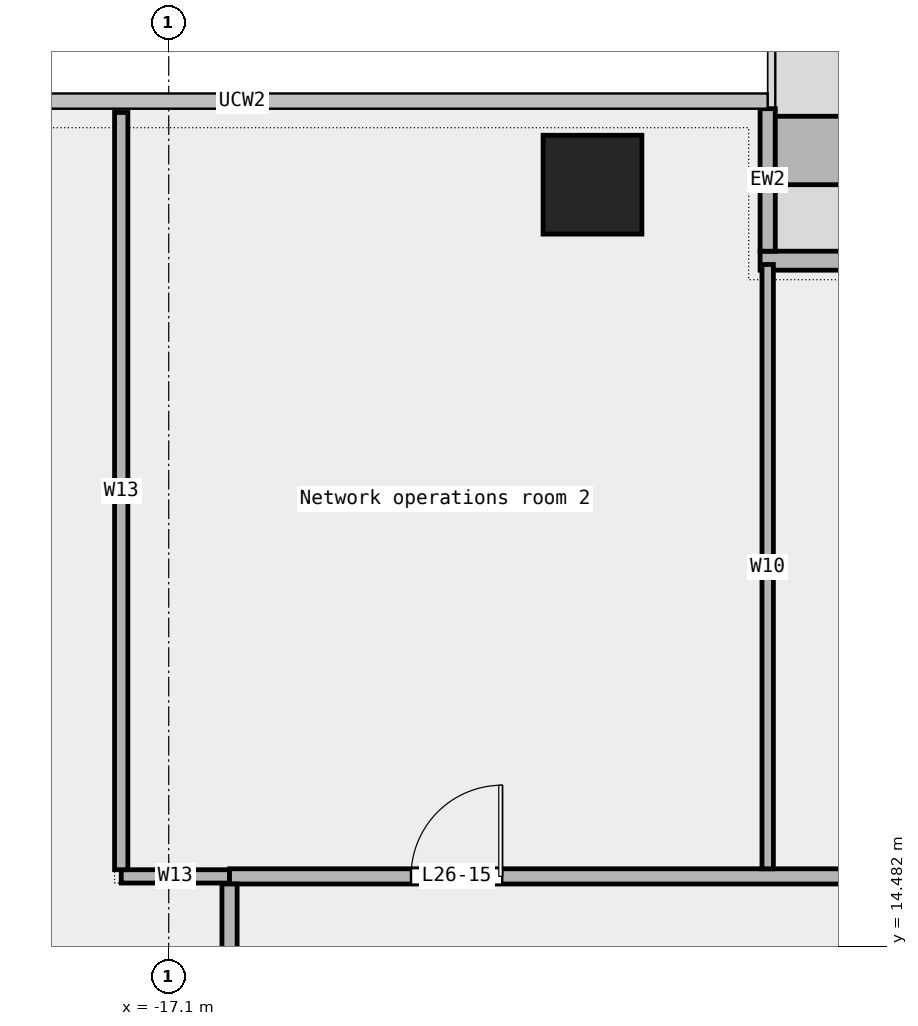
"""IFC4 building model, lengths in metres.
Left out: names, types, materials, properties, quantities, classifications, styles, units other than length and angle.
Written with IfcOpenShell. Run it as: python <this file> out.ifc"""

import sys

from ifc_helpers import new_model, si_unit, direction, frame, frame_2d, origin, origin_2d, place, context, subcontext, project, spatial, rectangle, extrude, element, fill, save


model = new_model("IFC4")
c1 = context("Model", 3, precision=1e-05, world=origin(), true_north=direction((0.0, 1.0)))
c2 = subcontext(c1, "Body", "Model", "MODEL_VIEW")
j1 = project(units=[si_unit("LENGTHUNIT", "METRE"), si_unit("PLANEANGLEUNIT", "RADIAN")], contexts=[c1])
p1 = place(None, origin())
s1 = spatial("IfcSite", under=j1, at=p1, CompositionType="ELEMENT")
p2 = place(p1, origin())
s2 = spatial("IfcBuilding", under=s1, at=p2, CompositionType="ELEMENT")
p3 = place(p2, frame((0.0, 0.0, 130.6)))
s3 = spatial("IfcBuildingStorey", under=s2, at=p3, CompositionType="ELEMENT", Elevation=130.6)
p4 = place(p3, frame((-11.525, 24.5, 0.0), z_axis=(0.0, 0.0, 1.0), x_axis=(1.0, 0.0, 0.0)))
e1 = element("IfcColumn", 1, at=p4, inside=s3, PredefinedType="COLUMN", context=c2, shape_type="SweptSolid", body=[
    extrude(rectangle(XDim=1.3, YDim=1.3, at=origin_2d()), origin(), (0.0, 0.0, 1.0), 4.05),
])
p5 = place(p3, frame((4.71, 23.5, 0.0), z_axis=(0.0, 0.0, 1.0), x_axis=(-1.0, 0.0, 0.0)))
e2 = element("IfcWall", 2, at=p5, inside=s3, PredefinedType="STANDARD", context=c2, shape_type="SweptSolid", body=[
    extrude(rectangle(XDim=14.03, YDim=0.25, at=frame_2d((7.015, 0.0))), origin(), (0.0, 0.0, 1.0), 4.05),
])
p6 = place(p5, frame((1.75, 0.0, 0.45)))
e3 = element("IfcOpeningElement", 3, at=p6, cuts=e2, PredefinedType="OPENING", context=c2, shape_type="SweptSolid", body=[
    extrude(rectangle(XDim=1.5, YDim=3.0, at=frame_2d((0.75, 1.5))), frame((0.0, 0.137, 0.0), z_axis=(0.0, -1.0, 0.0), x_axis=(1.0, 0.0, 0.0)), (0.0, 0.0, 1.0), 0.274),
])
p7 = place(p5, frame((6.0, 0.0, 0.0)))
e4 = element("IfcOpeningElement", 4, at=p7, cuts=e2, PredefinedType="OPENING", context=c2, shape_type="SweptSolid", body=[
    extrude(rectangle(XDim=1.8, YDim=2.4, at=frame_2d((0.9, 1.2))), frame((0.0, 0.137, 0.0), z_axis=(0.0, -1.0, 0.0), x_axis=(1.0, 0.0, 0.0)), (0.0, 0.0, 1.0), 0.274),
])
p8 = place(p5, frame((10.75, 0.0, 0.45)))
e5 = element("IfcOpeningElement", 5, at=p8, cuts=e2, PredefinedType="OPENING", context=c2, shape_type="SweptSolid", body=[
    extrude(rectangle(XDim=1.5, YDim=3.0, at=frame_2d((0.75, 1.5))), frame((0.0, 0.137, 0.0), z_axis=(0.0, -1.0, 0.0), x_axis=(1.0, 0.0, 0.0)), (0.0, 0.0, 1.0), 0.274),
])
p9 = place(p3, frame((-9.22, 25.5, 0.0), z_axis=(0.0, 0.0, 1.0), x_axis=(0.0, -1.0, 0.0)))
e6 = element("IfcWall", 6, at=p9, inside=s3, PredefinedType="STANDARD", context=c2, shape_type="SweptSolid", body=[
    extrude(rectangle(XDim=1.875, YDim=0.2, at=frame_2d((0.938, 0.0))), origin(), (0.0, 0.0, 1.0), 4.05),
])
p10 = place(p3, frame((-5.52, 24.95, 0.0), z_axis=(0.0, 0.0, 1.0), x_axis=(-1.0, 0.0, 0.0)))
e7 = element("IfcWall", 7, at=p10, inside=s3, PredefinedType="STANDARD", context=c2, shape_type="SweptSolid", body=[
    extrude(rectangle(XDim=3.6, YDim=0.9, at=frame_2d((1.8, 0.0))), origin(), (0.0, 0.0, 1.0), 0.7),
])
p11 = place(p3, frame((-17.725, 15.4, 0.0), z_axis=(0.0, 0.0, 1.0), x_axis=(1.0, 0.0, 0.0)))
e8 = element("IfcWall", 8, at=p11, inside=s3, PredefinedType="PARTITIONING", context=c2, shape_type="SweptSolid", body=[
    extrude(rectangle(XDim=1.425, YDim=0.175, at=frame_2d((0.712, 0.0))), origin(), (0.0, 0.0, 1.0), 4.05),
])
p12 = place(p3, frame((-16.3, 15.4, 0.0), z_axis=(0.0, 0.0, 1.0), x_axis=(1.0, 0.0, 0.0)))
e9 = element("IfcWall", 9, at=p12, inside=s3, PredefinedType="PARTITIONING", context=c2, shape_type="SweptSolid", body=[
    extrude(rectangle(XDim=20.91, YDim=0.2, at=frame_2d((10.455, 0.0))), origin(), (0.0, 0.0, 1.0), 4.05),
])
p13 = place(p12, frame((13.245, 0.0, 0.0)))
e10 = element("IfcOpeningElement", 10, at=p13, cuts=e9, PredefinedType="OPENING", context=c2, shape_type="SweptSolid", body=[
    extrude(rectangle(XDim=1.5, YDim=2.1, at=frame_2d((0.75, 1.05))), frame((0.0, 0.112, 0.0), z_axis=(0.0, -1.0, 0.0), x_axis=(1.0, 0.0, 0.0)), (0.0, 0.0, 1.0), 0.224),
])
p14 = place(p12, frame((2.387, 0.0, 0.0)))
e11 = element("IfcOpeningElement", 11, at=p14, cuts=e9, PredefinedType="OPENING", context=c2, shape_type="SweptSolid", body=[
    extrude(rectangle(XDim=1.2, YDim=2.1, at=frame_2d((0.6, 1.05))), frame((0.0, 0.112, 0.0), z_axis=(0.0, -1.0, 0.0), x_axis=(1.0, 0.0, 0.0)), (0.0, 0.0, 1.0), 0.224),
])
p15 = place(p3, frame((-17.725, 15.488, 0.0), z_axis=(0.0, 0.0, 1.0), x_axis=(0.0, 1.0, 0.0)))
e12 = element("IfcWall", 12, at=p15, inside=s3, PredefinedType="PARTITIONING", context=c2, shape_type="SweptSolid", body=[
    extrude(rectangle(XDim=9.962, YDim=0.175, at=frame_2d((4.981, 0.0))), origin(), (0.0, 0.0, 1.0), 4.05),
])
p16 = place(p3, frame((-16.3, 11.75, 0.0), z_axis=(0.0, 0.0, 1.0), x_axis=(0.0, 1.0, 0.0)))
e13 = element("IfcWall", 13, at=p16, inside=s3, PredefinedType="PARTITIONING", context=c2, shape_type="SweptSolid", body=[
    extrude(rectangle(XDim=3.55, YDim=0.2, at=frame_2d((1.775, 0.0))), origin(), (0.0, 0.0, 1.0), 4.05),
])
p17 = place(p3, frame((-9.22, 15.5, 0.0), z_axis=(0.0, 0.0, 1.0), x_axis=(0.0, 1.0, 0.0)))
e14 = element("IfcWall", 14, at=p17, inside=s3, PredefinedType="PARTITIONING", context=c2, shape_type="SweptSolid", body=[
    extrude(rectangle(XDim=7.95, YDim=0.15, at=frame_2d((3.975, 0.0))), origin(), (0.0, 0.0, 1.0), 4.05),
])
p18 = place(p14, origin())
e15 = element("IfcDoor", 15, at=p18, inside=s3, OperationType="SINGLE_SWING_RIGHT", PredefinedType="DOOR", context=c2, shape_type="SweptSolid", body=[
    extrude(rectangle(XDim=1.2, YDim=2.1, at=frame_2d((0.6, 1.05))), frame((0.0, 0.025, 0.0), z_axis=(0.0, -1.0, 0.0), x_axis=(1.0, 0.0, 0.0)), (0.0, 0.0, 1.0), 0.05),
])
fill(e11, e15)
save(model, sys.argv[1])
